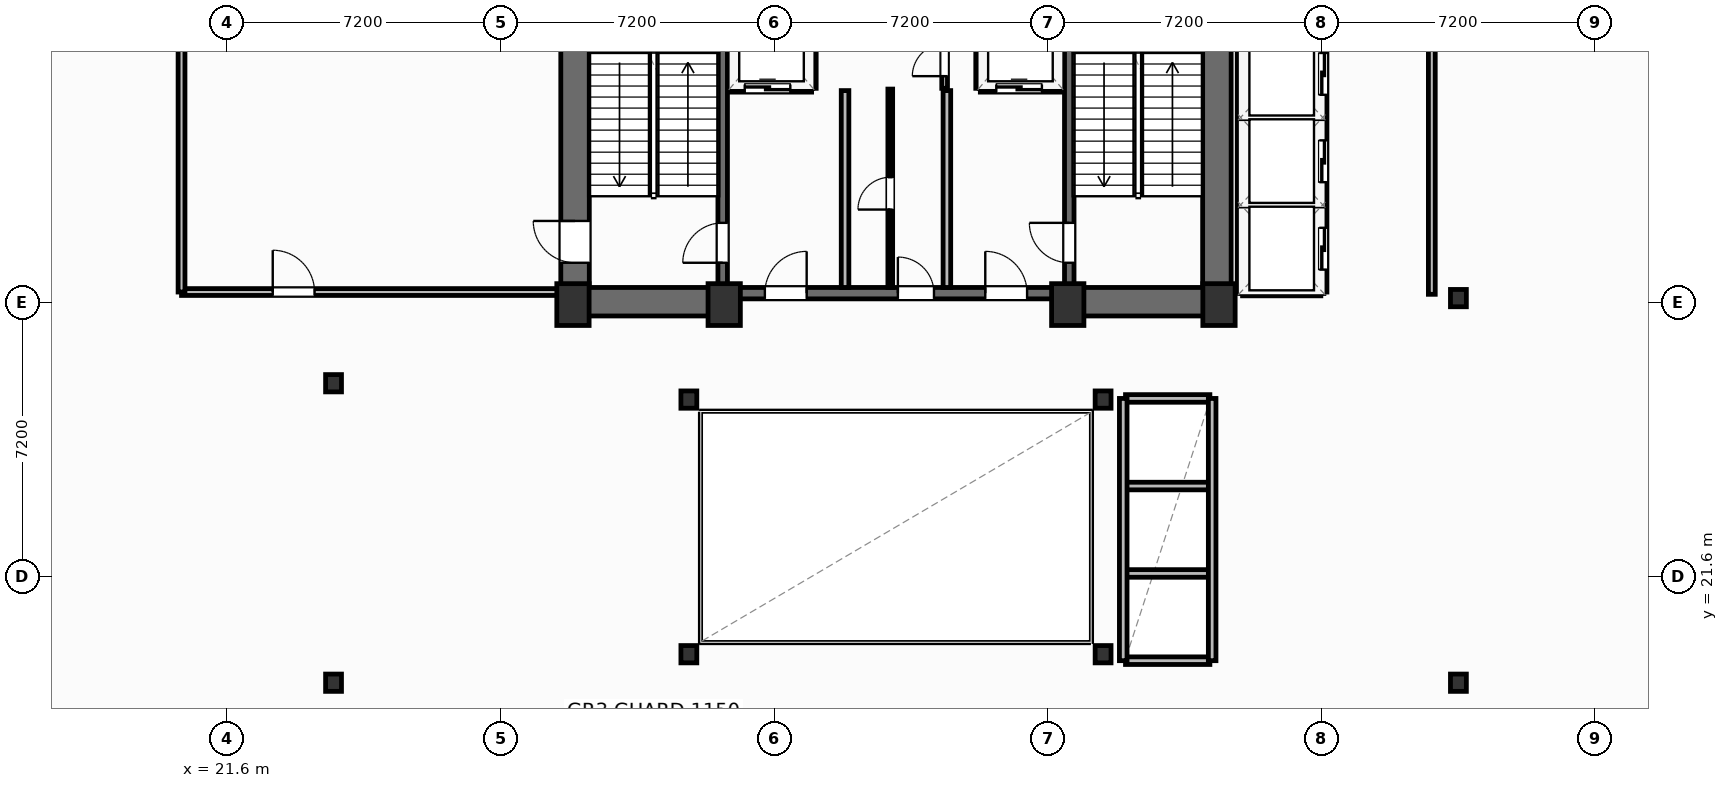
"""IFC4 building model, lengths in metres.
Left out: names, types, materials, properties, quantities, classifications, styles, units other than length and angle.
Written with IfcOpenShell. Run it as: python <this file> out.ifc"""

import sys

from ifc_helpers import new_model, si_unit, direction, frame, frame_2d, origin, origin_2d, place, context, subcontext, project, spatial, rectangle, i_section, extrude, element, fill, save


model = new_model("IFC4")
c1 = context("Model", 3, precision=1e-05, world=origin(), true_north=direction((0.0, 1.0)))
c2 = subcontext(c1, "Body", "Model", "MODEL_VIEW")
j1 = project(units=[si_unit("LENGTHUNIT", "METRE"), si_unit("PLANEANGLEUNIT", "RADIAN")], contexts=[c1])
p1 = place(None, origin())
s1 = spatial("IfcSite", under=j1, at=p1, CompositionType="ELEMENT")
p2 = place(p1, origin())
s2 = spatial("IfcBuilding", under=s1, at=p2, CompositionType="ELEMENT")
p3 = place(p2, frame((0.0, 0.0, 162.4)))
s3 = spatial("IfcBuildingStorey", under=s2, at=p3, CompositionType="ELEMENT", Elevation=162.4)
for number, where, z_axis, x_axis in (
    (1, (30.7, 28.75, 0.0), (0.0, 0.0, 1.0), (1.0, 0.0, 0.0)),
    (2, (34.68, 28.75, 0.0), (0.0, 0.0, 1.0), (1.0, 0.0, 0.0)),
    (3, (43.72, 28.75, 0.0), (0.0, 0.0, 1.0), (1.0, 0.0, 0.0)),
    (4, (47.7, 28.75, 0.0), (0.0, 0.0, 1.0), (1.0, 0.0, 0.0)),
):
    element("IfcColumn", number, at=place(p3, frame(where, z_axis=z_axis, x_axis=x_axis)), inside=s3, PredefinedType="COLUMN", context=c2, shape_type="SweptSolid", body=[
        extrude(rectangle(XDim=0.85, YDim=1.1, at=origin_2d()), origin(), (0.0, 0.0, 1.0), 4.8),
    ])
for number, where, z_axis, x_axis in (
    (5, (33.75, 19.55, 0.0), (0.0, 0.0, 1.0), (1.0, 0.0, 0.0)),
    (6, (44.65, 19.55, 0.0), (0.0, 0.0, 1.0), (1.0, 0.0, 0.0)),
    (7, (33.75, 26.25, 0.0), (0.0, 0.0, 1.0), (1.0, 0.0, 0.0)),
    (8, (44.65, 26.25, 0.0), (0.0, 0.0, 1.0), (1.0, 0.0, 0.0)),
    (9, (24.4, 18.8, 0.0), (0.0, 0.0, 1.0), (1.0, 0.0, 0.0)),
    (10, (24.4, 26.68, 0.0), (0.0, 0.0, 1.0), (1.0, 0.0, 0.0)),
    (11, (54.0, 18.8, 0.0), (0.0, 0.0, 1.0), (1.0, 0.0, 0.0)),
    (12, (54.0, 28.92, 0.0), (0.0, 0.0, 1.0), (1.0, 0.0, 0.0)),
):
    element("IfcColumn", number, at=place(p3, frame(where, z_axis=z_axis, x_axis=x_axis)), inside=s3, PredefinedType="COLUMN", context=c2, shape_type="SweptSolid", body=[
        extrude(i_section(OverallWidth=0.418, OverallDepth=0.455, WebThickness=0.042, FlangeThickness=0.068, FilletRadius=0.025, at=origin_2d()), origin(), (0.0, 0.0, 1.0), 4.8),
    ])
p4 = place(p3, frame((30.755, 29.2, 0.0), z_axis=(0.0, 0.0, 1.0), x_axis=(0.0, 1.0, 0.0)))
e13 = element("IfcWall", 13, at=p4, inside=s3, PredefinedType="SHEAR", context=c2, shape_type="SweptSolid", body=[
    extrude(rectangle(XDim=9.22, YDim=0.75, at=frame_2d((4.61, 0.0))), origin(), (0.0, 0.0, 1.0), 4.55),
])
p5 = place(p4, frame((0.65, 0.0, 0.0)))
e14 = element("IfcOpeningElement", 14, at=p5, cuts=e13, PredefinedType="OPENING", context=c2, shape_type="SweptSolid", body=[
    extrude(rectangle(XDim=1.1, YDim=2.15, at=frame_2d((0.55, 1.075))), frame((0.0, 0.385, 0.0), z_axis=(0.0, -1.0, 0.0), x_axis=(1.0, 0.0, 0.0)), (0.0, 0.0, 1.0), 0.77),
])
p6 = place(p3, frame((47.645, 29.2, 0.0), z_axis=(0.0, 0.0, 1.0), x_axis=(0.0, 1.0, 0.0)))
e15 = element("IfcWall", 15, at=p6, inside=s3, PredefinedType="SHEAR", context=c2, shape_type="SweptSolid", body=[
    extrude(rectangle(XDim=9.22, YDim=0.75, at=frame_2d((4.61, 0.0))), origin(), (0.0, 0.0, 1.0), 4.55),
])
p7 = place(p3, frame((30.38, 28.825, 0.0), z_axis=(0.0, 0.0, 1.0), x_axis=(1.0, 0.0, 0.0)))
e16 = element("IfcWall", 16, at=p7, inside=s3, PredefinedType="SHEAR", context=c2, shape_type="SweptSolid", body=[
    extrude(rectangle(XDim=4.42, YDim=0.75, at=frame_2d((2.21, 0.0))), origin(), (0.0, 0.0, 1.0), 4.55),
])
p8 = place(p3, frame((43.6, 28.825, 0.0), z_axis=(0.0, 0.0, 1.0), x_axis=(1.0, 0.0, 0.0)))
e17 = element("IfcWall", 17, at=p8, inside=s3, PredefinedType="SHEAR", context=c2, shape_type="SweptSolid", body=[
    extrude(rectangle(XDim=4.42, YDim=0.75, at=frame_2d((2.21, 0.0))), origin(), (0.0, 0.0, 1.0), 4.55),
])
p9 = place(p3, frame((34.8, 29.05, 0.0), z_axis=(0.0, 0.0, 1.0), x_axis=(1.0, 0.0, 0.0)))
e18 = element("IfcWall", 18, at=p9, inside=s3, PredefinedType="SHEAR", context=c2, shape_type="SweptSolid", body=[
    extrude(rectangle(XDim=8.8, YDim=0.3, at=frame_2d((4.4, 0.0))), origin(), (0.0, 0.0, 1.0), 4.55),
])
p10 = place(p9, frame((0.95, 0.0, 0.0)))
e19 = element("IfcOpeningElement", 19, at=p10, cuts=e18, PredefinedType="OPENING", context=c2, shape_type="SweptSolid", body=[
    extrude(rectangle(XDim=1.1, YDim=2.15, at=frame_2d((0.55, 1.075))), frame((0.0, 0.16, 0.0), z_axis=(0.0, -1.0, 0.0), x_axis=(1.0, 0.0, 0.0)), (0.0, 0.0, 1.0), 0.32),
])
p11 = place(p9, frame((6.75, 0.0, 0.0)))
e20 = element("IfcOpeningElement", 20, at=p11, cuts=e18, PredefinedType="OPENING", context=c2, shape_type="SweptSolid", body=[
    extrude(rectangle(XDim=1.1, YDim=2.15, at=frame_2d((0.55, 1.075))), frame((0.0, 0.16, 0.0), z_axis=(0.0, -1.0, 0.0), x_axis=(1.0, 0.0, 0.0)), (0.0, 0.0, 1.0), 0.32),
])
p12 = place(p9, frame((4.45, 0.0, 0.0)))
e21 = element("IfcOpeningElement", 21, at=p12, cuts=e18, PredefinedType="OPENING", context=c2, shape_type="SweptSolid", body=[
    extrude(rectangle(XDim=0.95, YDim=2.15, at=frame_2d((0.475, 1.075))), frame((0.0, 0.16, 0.0), z_axis=(0.0, -1.0, 0.0), x_axis=(1.0, 0.0, 0.0)), (0.0, 0.0, 1.0), 0.32),
])
p13 = place(p3, frame((34.64, 29.2, 0.0), z_axis=(0.0, 0.0, 1.0), x_axis=(0.0, 1.0, 0.0)))
e22 = element("IfcWall", 22, at=p13, inside=s3, PredefinedType="SHEAR", context=c2, shape_type="SweptSolid", body=[
    extrude(rectangle(XDim=9.22, YDim=0.25, at=frame_2d((4.61, 0.0))), origin(), (0.0, 0.0, 1.0), 4.55),
])
p14 = place(p13, frame((0.65, 0.0, 0.0)))
e23 = element("IfcOpeningElement", 23, at=p14, cuts=e22, PredefinedType="OPENING", context=c2, shape_type="SweptSolid", body=[
    extrude(rectangle(XDim=1.05, YDim=2.15, at=frame_2d((0.525, 1.075))), frame((0.0, 0.135, 0.0), z_axis=(0.0, -1.0, 0.0), x_axis=(1.0, 0.0, 0.0)), (0.0, 0.0, 1.0), 0.27),
])
p15 = place(p3, frame((43.76, 29.2, 0.0), z_axis=(0.0, 0.0, 1.0), x_axis=(0.0, 1.0, 0.0)))
e24 = element("IfcWall", 24, at=p15, inside=s3, PredefinedType="SHEAR", context=c2, shape_type="SweptSolid", body=[
    extrude(rectangle(XDim=9.22, YDim=0.25, at=frame_2d((4.61, 0.0))), origin(), (0.0, 0.0, 1.0), 4.55),
])
p16 = place(p15, frame((0.65, 0.0, 0.0)))
e25 = element("IfcOpeningElement", 25, at=p16, cuts=e24, PredefinedType="OPENING", context=c2, shape_type="SweptSolid", body=[
    extrude(rectangle(XDim=1.05, YDim=2.15, at=frame_2d((0.525, 1.075))), frame((0.0, 0.135, 0.0), z_axis=(0.0, -1.0, 0.0), x_axis=(1.0, 0.0, 0.0)), (0.0, 0.0, 1.0), 0.27),
])
p17 = place(p3, frame((20.4, 29.08, 0.0), z_axis=(0.0, 0.0, 1.0), x_axis=(1.0, 0.0, 0.0)))
e26 = element("IfcWall", 26, at=p17, inside=s3, PredefinedType="PARTITIONING", context=c2, shape_type="SweptSolid", body=[
    extrude(rectangle(XDim=9.95, YDim=0.18, at=frame_2d((4.975, 0.0))), origin(), (0.0, 0.0, 1.0), 4.55),
])
p18 = place(p17, frame((2.4, 0.0, 0.0)))
e27 = element("IfcOpeningElement", 27, at=p18, cuts=e26, PredefinedType="OPENING", context=c2, shape_type="SweptSolid", body=[
    extrude(rectangle(XDim=1.1, YDim=2.15, at=frame_2d((0.55, 1.075))), frame((0.0, 0.1, 0.0), z_axis=(0.0, -1.0, 0.0), x_axis=(1.0, 0.0, 0.0)), (0.0, 0.0, 1.0), 0.2),
])
p19 = place(p3, frame((20.4, 29.08, 0.0), z_axis=(0.0, 0.0, 1.0), x_axis=(0.0, 1.0, 0.0)))
e28 = element("IfcWall", 28, at=p19, inside=s3, PredefinedType="PARTITIONING", context=c2, shape_type="SweptSolid", body=[
    extrude(rectangle(XDim=7.6, YDim=0.18, at=frame_2d((3.8, 0.0))), origin(), (0.0, 0.0, 1.0), 4.55),
])
p20 = place(p3, frame((53.3, 29.02, 0.0), z_axis=(0.0, 0.0, 1.0), x_axis=(0.0, 1.0, 0.0)))
e29 = element("IfcWall", 29, at=p20, inside=s3, PredefinedType="PARTITIONING", context=c2, shape_type="SweptSolid", body=[
    extrude(rectangle(XDim=10.28, YDim=0.18, at=frame_2d((5.14, 0.0))), origin(), (0.0, 0.0, 1.0), 4.55),
])
for number, where, z_axis, x_axis in (
    (30, (37.86, 29.2, 0.0), (0.0, 0.0, 1.0), (0.0, 1.0, 0.0)),
    (31, (40.54, 29.2, 0.0), (0.0, 0.0, 1.0), (0.0, 1.0, 0.0)),
):
    element("IfcWall", number, at=place(p3, frame(where, z_axis=z_axis, x_axis=x_axis)), inside=s3, PredefinedType="PARTITIONING", context=c2, shape_type="SweptSolid", body=[
        extrude(rectangle(XDim=5.18, YDim=0.2, at=frame_2d((2.59, 0.0))), origin(), (0.0, 0.0, 1.0), 4.55),
    ])
p21 = place(p3, frame((34.8, 34.44, 0.0), z_axis=(0.0, 0.0, 1.0), x_axis=(1.0, 0.0, 0.0)))
e32 = element("IfcWall", 32, at=p21, inside=s3, PredefinedType="PARTITIONING", context=c2, shape_type="SweptSolid", body=[
    extrude(rectangle(XDim=2.18, YDim=0.2, at=frame_2d((1.09, 0.0))), origin(), (0.0, 0.0, 1.0), 4.55),
])
p22 = place(p21, frame((0.42, 0.0, 0.0)))
e33 = element("IfcOpeningElement", 33, at=p22, cuts=e32, PredefinedType="OPENING", context=c2, shape_type="SweptSolid", body=[
    extrude(rectangle(XDim=1.2, YDim=2.2, at=frame_2d((0.6, 1.1))), frame((0.0, 0.11, 0.0), z_axis=(0.0, -1.0, 0.0), x_axis=(1.0, 0.0, 0.0)), (0.0, 0.0, 1.0), 0.22),
])
p23 = place(p3, frame((37.0, 34.44, 0.0), z_axis=(0.0, 0.0, 1.0), x_axis=(0.0, 1.0, 0.0)))
e34 = element("IfcWall", 34, at=p23, inside=s3, PredefinedType="PARTITIONING", context=c2, shape_type="SweptSolid", body=[
    extrude(rectangle(XDim=3.9, YDim=0.2, at=frame_2d((1.95, 0.0))), origin(), (0.0, 0.0, 1.0), 4.55),
])
p24 = place(p3, frame((41.42, 34.44, 0.0), z_axis=(0.0, 0.0, 1.0), x_axis=(1.0, 0.0, 0.0)))
e35 = element("IfcWall", 35, at=p24, inside=s3, PredefinedType="PARTITIONING", context=c2, shape_type="SweptSolid", body=[
    extrude(rectangle(XDim=2.18, YDim=0.2, at=frame_2d((1.09, 0.0))), origin(), (0.0, 0.0, 1.0), 4.55),
])
p25 = place(p24, frame((0.42, 0.0, 0.0)))
e36 = element("IfcOpeningElement", 36, at=p25, cuts=e35, PredefinedType="OPENING", context=c2, shape_type="SweptSolid", body=[
    extrude(rectangle(XDim=1.2, YDim=2.2, at=frame_2d((0.6, 1.1))), frame((0.0, 0.11, 0.0), z_axis=(0.0, -1.0, 0.0), x_axis=(1.0, 0.0, 0.0)), (0.0, 0.0, 1.0), 0.22),
])
p26 = place(p3, frame((41.4, 34.44, 0.0), z_axis=(0.0, 0.0, 1.0), x_axis=(0.0, 1.0, 0.0)))
e37 = element("IfcWall", 37, at=p26, inside=s3, PredefinedType="PARTITIONING", context=c2, shape_type="SweptSolid", body=[
    extrude(rectangle(XDim=3.9, YDim=0.2, at=frame_2d((1.95, 0.0))), origin(), (0.0, 0.0, 1.0), 4.55),
])
p27 = place(p3, frame((40.48, 34.44, 0.0), z_axis=(0.0, 0.0, 1.0), x_axis=(0.0, 1.0, 0.0)))
e38 = element("IfcWall", 38, at=p27, inside=s3, PredefinedType="PARTITIONING", context=c2, shape_type="SweptSolid", body=[
    extrude(rectangle(XDim=1.52, YDim=0.15, at=frame_2d((0.76, 0.0))), origin(), (0.0, 0.0, 1.0), 4.55),
])
p28 = place(p27, frame((0.32, 0.0, 0.0)))
e39 = element("IfcOpeningElement", 39, at=p28, cuts=e38, PredefinedType="OPENING", context=c2, shape_type="SweptSolid", body=[
    extrude(rectangle(XDim=0.85, YDim=2.05, at=frame_2d((0.425, 1.025))), frame((0.0, 0.085, 0.0), z_axis=(0.0, -1.0, 0.0), x_axis=(1.0, 0.0, 0.0)), (0.0, 0.0, 1.0), 0.17),
])
p29 = place(p3, frame((39.05, 29.2, 0.0), z_axis=(0.0, 0.0, 1.0), x_axis=(0.0, 1.0, 0.0)))
e40 = element("IfcWall", 40, at=p29, inside=s3, PredefinedType="PARTITIONING", context=c2, shape_type="SweptSolid", body=[
    extrude(rectangle(XDim=5.22, YDim=0.125, at=frame_2d((2.61, 0.0))), origin(), (0.0, 0.0, 1.0), 4.55),
])
p30 = place(p29, frame((2.05, 0.0, 0.0)))
e41 = element("IfcOpeningElement", 41, at=p30, cuts=e40, PredefinedType="OPENING", context=c2, shape_type="SweptSolid", body=[
    extrude(rectangle(XDim=0.85, YDim=2.05, at=frame_2d((0.425, 1.025))), frame((0.0, 0.073, 0.0), z_axis=(0.0, -1.0, 0.0), x_axis=(1.0, 0.0, 0.0)), (0.0, 0.0, 1.0), 0.145),
])
for number, where, z_axis, x_axis in (
    (42, (48.32, 31.375, 0.0), (0.0, 0.0, 1.0), (1.0, 0.0, 0.0)),
    (43, (48.32, 33.675, 0.0), (0.0, 0.0, 1.0), (1.0, 0.0, 0.0)),
):
    element("IfcWall", number, at=place(p3, frame(where, z_axis=z_axis, x_axis=x_axis)), inside=s3, PredefinedType="PARTITIONING", context=c2, shape_type="SweptSolid", body=[
        extrude(rectangle(XDim=2.06, YDim=0.2, at=frame_2d((1.03, 0.0))), origin(), (0.0, 0.0, 1.0), 4.55),
    ])
p31 = place(p3, frame((48.32, 29.08, 0.0), z_axis=(0.0, 0.0, 1.0), x_axis=(1.0, 0.0, 0.0)))
e44 = element("IfcWall", 44, at=p31, inside=s3, PredefinedType="PARTITIONING", context=c2, shape_type="SweptSolid", body=[
    extrude(rectangle(XDim=2.06, YDim=0.2, at=frame_2d((1.03, 0.0))), origin(), (0.0, 0.0, 1.0), 3.762),
])
p32 = place(p3, frame((48.28, 29.08, 0.0), z_axis=(0.0, 0.0, 1.0), x_axis=(0.0, 1.0, 0.0)))
e45 = element("IfcWall", 45, at=p32, inside=s3, PredefinedType="PARTITIONING", context=c2, shape_type="SweptSolid", body=[
    extrude(rectangle(XDim=6.89, YDim=0.2, at=frame_2d((3.445, 0.0))), origin(), (0.0, 0.0, 1.0), 4.55),
])
p33 = place(p3, frame((50.44, 29.08, 0.0), z_axis=(0.0, 0.0, 1.0), x_axis=(0.0, 1.0, 0.0)))
e46 = element("IfcWall", 46, at=p33, inside=s3, PredefinedType="PARTITIONING", context=c2, shape_type="SweptSolid", body=[
    extrude(rectangle(XDim=6.89, YDim=0.2, at=frame_2d((3.445, 0.0))), origin(), (0.0, 0.0, 1.0), 4.55),
])
p34 = place(p33, frame((0.59, 0.0, 0.0)))
e47 = element("IfcOpeningElement", 47, at=p34, cuts=e46, PredefinedType="OPENING", context=c2, shape_type="SweptSolid", body=[
    extrude(rectangle(XDim=1.1, YDim=2.15, at=frame_2d((0.55, 1.075))), frame((0.0, 0.11, 0.0), z_axis=(0.0, -1.0, 0.0), x_axis=(1.0, 0.0, 0.0)), (0.0, 0.0, 1.0), 0.22),
])
p35 = place(p33, frame((2.89, 0.0, 0.0)))
e48 = element("IfcOpeningElement", 48, at=p35, cuts=e46, PredefinedType="OPENING", context=c2, shape_type="SweptSolid", body=[
    extrude(rectangle(XDim=1.1, YDim=2.15, at=frame_2d((0.55, 1.075))), frame((0.0, 0.11, 0.0), z_axis=(0.0, -1.0, 0.0), x_axis=(1.0, 0.0, 0.0)), (0.0, 0.0, 1.0), 0.22),
])
p36 = place(p33, frame((5.19, 0.0, 0.0)))
e49 = element("IfcOpeningElement", 49, at=p36, cuts=e46, PredefinedType="OPENING", context=c2, shape_type="SweptSolid", body=[
    extrude(rectangle(XDim=1.1, YDim=2.15, at=frame_2d((0.55, 1.075))), frame((0.0, 0.11, 0.0), z_axis=(0.0, -1.0, 0.0), x_axis=(1.0, 0.0, 0.0)), (0.0, 0.0, 1.0), 0.22),
])
for number, where, z_axis, x_axis in (
    (50, (45.24, 21.675, 0.0), (0.0, 0.0, 1.0), (1.0, 0.0, 0.0)),
    (51, (45.24, 23.975, 0.0), (0.0, 0.0, 1.0), (1.0, 0.0, 0.0)),
):
    element("IfcWall", number, at=place(p3, frame(where, z_axis=z_axis, x_axis=x_axis)), inside=s3, PredefinedType="PARTITIONING", context=c2, shape_type="SweptSolid", body=[
        extrude(rectangle(XDim=2.22, YDim=0.2, at=frame_2d((1.11, 0.0))), origin(), (0.0, 0.0, 1.0), 4.55),
    ])
p37 = place(p3, frame((45.24, 19.38, 0.0), z_axis=(0.0, 0.0, 1.0), x_axis=(1.0, 0.0, 0.0)))
e52 = element("IfcWall", 52, at=p37, inside=s3, PredefinedType="PARTITIONING", context=c2, shape_type="SweptSolid", body=[
    extrude(rectangle(XDim=2.22, YDim=0.2, at=frame_2d((1.11, 0.0))), origin(), (0.0, 0.0, 1.0), 3.762),
])
p38 = place(p3, frame((45.24, 26.28, 0.0), z_axis=(0.0, 0.0, 1.0), x_axis=(1.0, 0.0, 0.0)))
e53 = element("IfcWall", 53, at=p38, inside=s3, PredefinedType="PARTITIONING", context=c2, shape_type="SweptSolid", body=[
    extrude(rectangle(XDim=2.22, YDim=0.2, at=frame_2d((1.11, 0.0))), origin(), (0.0, 0.0, 1.0), 4.55),
])
for number, where, z_axis, x_axis in (
    (54, (45.18, 19.38, 0.0), (0.0, 0.0, 1.0), (0.0, 1.0, 0.0)),
    (55, (47.52, 19.38, 0.0), (0.0, 0.0, 1.0), (0.0, 1.0, 0.0)),
):
    element("IfcWall", number, at=place(p3, frame(where, z_axis=z_axis, x_axis=x_axis)), inside=s3, PredefinedType="PARTITIONING", context=c2, shape_type="SweptSolid", body=[
        extrude(rectangle(XDim=6.9, YDim=0.2, at=frame_2d((3.45, 0.0))), origin(), (0.0, 0.0, 1.0), 4.55),
    ])
p39 = place(p5, origin())
e56 = element("IfcDoor", 56, at=p39, inside=s3, OperationType="SINGLE_SWING_RIGHT", PredefinedType="DOOR", context=c2, shape_type="SweptSolid", body=[
    extrude(rectangle(XDim=1.1, YDim=2.15, at=frame_2d((0.55, 1.075))), frame((0.0, 0.025, 0.0), z_axis=(0.0, -1.0, 0.0), x_axis=(1.0, 0.0, 0.0)), (0.0, 0.0, 1.0), 0.05),
])
fill(e14, e56)
p40 = place(p18, origin())
e57 = element("IfcDoor", 57, at=p40, inside=s3, OperationType="SINGLE_SWING_LEFT", PredefinedType="DOOR", context=c2, shape_type="SweptSolid", body=[
    extrude(rectangle(XDim=1.1, YDim=2.15, at=frame_2d((0.55, 1.075))), frame((0.0, 0.025, 0.0), z_axis=(0.0, -1.0, 0.0), x_axis=(1.0, 0.0, 0.0)), (0.0, 0.0, 1.0), 0.05),
])
fill(e27, e57)
p41 = place(p14, origin())
e58 = element("IfcDoor", 58, at=p41, inside=s3, OperationType="SINGLE_SWING_LEFT", PredefinedType="DOOR", context=c2, shape_type="SweptSolid", body=[
    extrude(rectangle(XDim=1.05, YDim=2.15, at=frame_2d((0.525, 1.075))), frame((0.0, 0.025, 0.0), z_axis=(0.0, -1.0, 0.0), x_axis=(1.0, 0.0, 0.0)), (0.0, 0.0, 1.0), 0.05),
])
fill(e23, e58)
p42 = place(p16, origin())
e59 = element("IfcDoor", 59, at=p42, inside=s3, OperationType="SINGLE_SWING_RIGHT", PredefinedType="DOOR", context=c2, shape_type="SweptSolid", body=[
    extrude(rectangle(XDim=1.05, YDim=2.15, at=frame_2d((0.525, 1.075))), frame((0.0, 0.025, 0.0), z_axis=(0.0, -1.0, 0.0), x_axis=(1.0, 0.0, 0.0)), (0.0, 0.0, 1.0), 0.05),
])
fill(e25, e59)
p43 = place(p10, origin())
e60 = element("IfcDoor", 60, at=p43, inside=s3, OperationType="SINGLE_SWING_RIGHT", PredefinedType="DOOR", context=c2, shape_type="SweptSolid", body=[
    extrude(rectangle(XDim=1.1, YDim=2.15, at=frame_2d((0.55, 1.075))), frame((0.0, 0.025, 0.0), z_axis=(0.0, -1.0, 0.0), x_axis=(1.0, 0.0, 0.0)), (0.0, 0.0, 1.0), 0.05),
])
fill(e19, e60)
p44 = place(p11, origin())
e61 = element("IfcDoor", 61, at=p44, inside=s3, OperationType="SINGLE_SWING_LEFT", PredefinedType="DOOR", context=c2, shape_type="SweptSolid", body=[
    extrude(rectangle(XDim=1.1, YDim=2.15, at=frame_2d((0.55, 1.075))), frame((0.0, 0.025, 0.0), z_axis=(0.0, -1.0, 0.0), x_axis=(1.0, 0.0, 0.0)), (0.0, 0.0, 1.0), 0.05),
])
fill(e20, e61)
p45 = place(p22, origin())
e62 = element("IfcDoor", 62, at=p45, inside=s3, OperationType="SLIDING_TO_LEFT", PredefinedType="DOOR", context=c2, shape_type="SweptSolid", body=[
    extrude(rectangle(XDim=1.2, YDim=2.2, at=frame_2d((0.6, 1.1))), frame((0.0, 0.025, 0.0), z_axis=(0.0, -1.0, 0.0), x_axis=(1.0, 0.0, 0.0)), (0.0, 0.0, 1.0), 0.05),
])
fill(e33, e62)
p46 = place(p25, origin())
e63 = element("IfcDoor", 63, at=p46, inside=s3, OperationType="SLIDING_TO_LEFT", PredefinedType="DOOR", context=c2, shape_type="SweptSolid", body=[
    extrude(rectangle(XDim=1.2, YDim=2.2, at=frame_2d((0.6, 1.1))), frame((0.0, 0.025, 0.0), z_axis=(0.0, -1.0, 0.0), x_axis=(1.0, 0.0, 0.0)), (0.0, 0.0, 1.0), 0.05),
])
fill(e36, e63)
p47 = place(p28, origin())
e64 = element("IfcDoor", 64, at=p47, inside=s3, OperationType="SINGLE_SWING_LEFT", PredefinedType="DOOR", context=c2, shape_type="SweptSolid", body=[
    extrude(rectangle(XDim=0.85, YDim=2.05, at=frame_2d((0.425, 1.025))), frame((0.0, 0.025, 0.0), z_axis=(0.0, -1.0, 0.0), x_axis=(1.0, 0.0, 0.0)), (0.0, 0.0, 1.0), 0.05),
])
fill(e39, e64)
p48 = place(p30, origin())
e65 = element("IfcDoor", 65, at=p48, inside=s3, OperationType="SINGLE_SWING_LEFT", PredefinedType="DOOR", context=c2, shape_type="SweptSolid", body=[
    extrude(rectangle(XDim=0.85, YDim=2.05, at=frame_2d((0.425, 1.025))), frame((0.0, 0.025, 0.0), z_axis=(0.0, -1.0, 0.0), x_axis=(1.0, 0.0, 0.0)), (0.0, 0.0, 1.0), 0.05),
])
fill(e41, e65)
p49 = place(p12, origin())
e66 = element("IfcDoor", 66, at=p49, inside=s3, OperationType="SINGLE_SWING_LEFT", PredefinedType="DOOR", context=c2, shape_type="SweptSolid", body=[
    extrude(rectangle(XDim=0.95, YDim=2.15, at=frame_2d((0.475, 1.075))), frame((0.0, 0.025, 0.0), z_axis=(0.0, -1.0, 0.0), x_axis=(1.0, 0.0, 0.0)), (0.0, 0.0, 1.0), 0.05),
])
fill(e21, e66)
p50 = place(p34, origin())
e67 = element("IfcDoor", 67, at=p50, inside=s3, OperationType="SLIDING_TO_LEFT", PredefinedType="DOOR", context=c2, shape_type="SweptSolid", body=[
    extrude(rectangle(XDim=1.1, YDim=2.15, at=frame_2d((0.55, 1.075))), frame((0.0, 0.025, 0.0), z_axis=(0.0, -1.0, 0.0), x_axis=(1.0, 0.0, 0.0)), (0.0, 0.0, 1.0), 0.05),
])
fill(e47, e67)
p51 = place(p35, origin())
e68 = element("IfcDoor", 68, at=p51, inside=s3, OperationType="SLIDING_TO_LEFT", PredefinedType="DOOR", context=c2, shape_type="SweptSolid", body=[
    extrude(rectangle(XDim=1.1, YDim=2.15, at=frame_2d((0.55, 1.075))), frame((0.0, 0.025, 0.0), z_axis=(0.0, -1.0, 0.0), x_axis=(1.0, 0.0, 0.0)), (0.0, 0.0, 1.0), 0.05),
])
fill(e48, e68)
p52 = place(p36, origin())
e69 = element("IfcDoor", 69, at=p52, inside=s3, OperationType="SLIDING_TO_LEFT", PredefinedType="DOOR", context=c2, shape_type="SweptSolid", body=[
    extrude(rectangle(XDim=1.1, YDim=2.15, at=frame_2d((0.55, 1.075))), frame((0.0, 0.025, 0.0), z_axis=(0.0, -1.0, 0.0), x_axis=(1.0, 0.0, 0.0)), (0.0, 0.0, 1.0), 0.05),
])
fill(e49, e69)
save(model, sys.argv[1])
